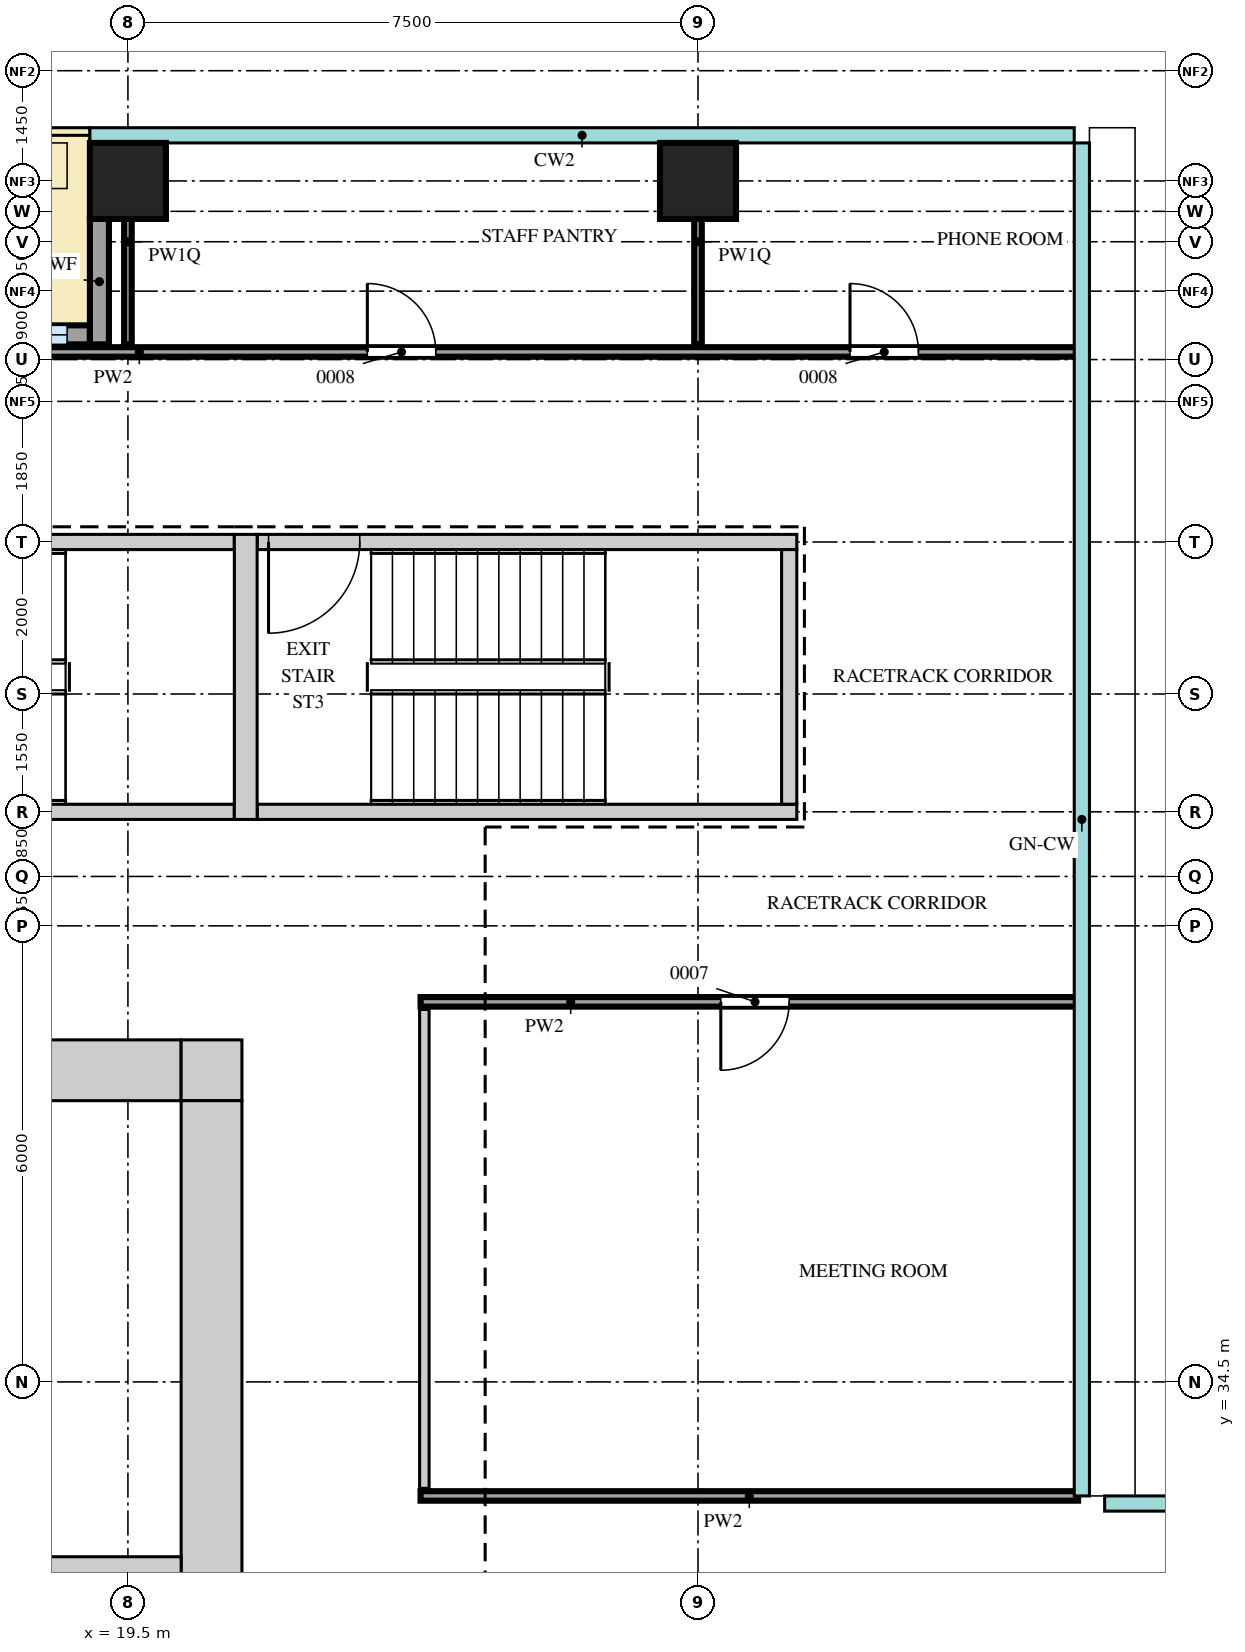
"""IFC4 building model, lengths in metres.
Left out: names, types, materials, properties, quantities, classifications, styles, units other than length and angle.
Written with IfcOpenShell. Run it as: python <this file> out.ifc"""

import sys

from ifc_helpers import new_model, si_unit, direction, frame, frame_2d, origin, origin_2d, place, context, subcontext, project, spatial, rectangle, extrude, source, transform, mapped, element, fill, save


model = new_model("IFC4")
c1 = context("Model", 3, precision=1e-05, world=origin(), true_north=direction((0.0, 1.0)))
c2 = subcontext(c1, "Body", "Model", "MODEL_VIEW")
j1 = project(units=[si_unit("LENGTHUNIT", "METRE"), si_unit("PLANEANGLEUNIT", "RADIAN")], contexts=[c1])
p1 = place(None, origin())
s1 = spatial("IfcSite", under=j1, at=p1, CompositionType="ELEMENT")
p2 = place(p1, origin())
s2 = spatial("IfcBuilding", under=s1, at=p2, CompositionType="ELEMENT")
p3 = place(p2, frame((0.0, 0.0, 172.7)))
s3 = spatial("IfcBuildingStorey", under=s2, at=p3, CompositionType="ELEMENT", Elevation=172.7)
m1 = source(origin(), c2, "Body", "SweptSolid", [
    extrude(rectangle(XDim=13.4, YDim=0.8, at=frame_2d((6.7, 0.0))), origin(), (0.0, 0.0, 1.0), 3.75),
])
p4 = place(p3, frame((6.8, 38.6, 0.0), z_axis=(0.0, 0.0, 1.0), x_axis=(1.0, 0.0, 0.0)))
e1 = element("IfcWall", 1, at=p4, inside=s3, PredefinedType="SHEAR", context=c2, shape_type="MappedRepresentation", body=[
    mapped(m1, transform((0.0, 0.0, 0.0))),
])
m2 = source(origin(), c2, "Body", "SweptSolid", [
    extrude(rectangle(XDim=0.9, YDim=2.1, at=frame_2d((0.45, 1.05))), frame((0.0, 0.41, 0.0), z_axis=(0.0, -1.0, 0.0), x_axis=(1.0, 0.0, 0.0)), (0.0, 0.0, 1.0), 0.82),
])
p5 = place(p4, frame((2.9, 0.0, 0.0)))
e2 = element("IfcOpeningElement", 2, at=p5, cuts=e1, PredefinedType="OPENING", context=c2, shape_type="MappedRepresentation", body=[
    mapped(m2, transform((0.0, 0.0, 0.0))),
])
p6 = place(p4, frame((9.6, 0.0, 0.0)))
e3 = element("IfcOpeningElement", 3, at=p6, cuts=e1, PredefinedType="OPENING", context=c2, shape_type="MappedRepresentation", body=[
    mapped(m2, transform((0.0, 0.0, 0.0))),
])
m3 = source(origin(), c2, "Body", "SweptSolid", [
    extrude(rectangle(XDim=0.8, YDim=0.8, at=frame_2d((0.4, 0.0))), origin(), (0.0, 0.0, 1.0), 3.75),
])
p7 = place(p3, frame((20.2, 38.6, 0.0), z_axis=(0.0, 0.0, 1.0), x_axis=(1.0, 0.0, 0.0)))
e4 = element("IfcWall", 4, at=p7, inside=s3, PredefinedType="SHEAR", context=c2, shape_type="MappedRepresentation", body=[
    mapped(m3, transform((0.0, 0.0, 0.0))),
])
m4 = source(origin(), c2, "Body", "SweptSolid", [
    extrude(rectangle(XDim=22.4, YDim=0.8, at=frame_2d((11.2, 0.0))), origin(), (0.0, 0.0, 1.0), 3.75),
])
p8 = place(p3, frame((20.6, 15.8, 0.0), z_axis=(0.0, 0.0, 1.0), x_axis=(0.0, 1.0, 0.0)))
e5 = element("IfcWall", 5, at=p8, inside=s3, PredefinedType="SHEAR", context=c2, shape_type="MappedRepresentation", body=[
    mapped(m4, transform((0.0, 0.0, 0.0))),
])
m5 = source(origin(), c2, "Body", "SweptSolid", [
    extrude(rectangle(XDim=1.8, YDim=2.1, at=frame_2d((0.9, 1.05))), frame((0.0, 0.41, 0.0), z_axis=(0.0, -1.0, 0.0), x_axis=(1.0, 0.0, 0.0)), (0.0, 0.0, 1.0), 0.82),
])
p9 = place(p8, frame((10.7, 0.0, 0.0)))
e6 = element("IfcOpeningElement", 6, at=p9, cuts=e5, PredefinedType="OPENING", context=c2, shape_type="MappedRepresentation", body=[
    mapped(m5, transform((0.0, 0.0, 0.0))),
])
p10 = place(p8, frame((0.35, 0.0, 0.0)))
e7 = element("IfcOpeningElement", 7, at=p10, cuts=e5, PredefinedType="OPENING", context=c2, shape_type="MappedRepresentation", body=[
    mapped(m2, transform((0.0, 0.0, 0.0))),
])
p11 = place(p8, frame((2.8, 0.0, 0.0)))
e8 = element("IfcOpeningElement", 8, at=p11, cuts=e5, PredefinedType="OPENING", context=c2, shape_type="MappedRepresentation", body=[
    mapped(m2, transform((0.0, 0.0, 0.0))),
])
p12 = place(p8, frame((5.55, 0.0, 0.0)))
e9 = element("IfcOpeningElement", 9, at=p12, cuts=e5, PredefinedType="OPENING", context=c2, shape_type="MappedRepresentation", body=[
    mapped(m2, transform((0.0, 0.0, 0.0))),
])
m6 = source(origin(), c2, "Body", "SweptSolid", [
    extrude(rectangle(XDim=7.0, YDim=0.2, at=frame_2d((3.5, 0.0))), origin(), (0.0, 0.0, 1.0), 3.75),
])
p13 = place(p3, frame((13.9, 45.55, 0.0), z_axis=(0.0, 0.0, 1.0), x_axis=(1.0, 0.0, 0.0)))
e10 = element("IfcWall", 10, at=p13, inside=s3, PredefinedType="SHEAR", context=c2, shape_type="MappedRepresentation", body=[
    mapped(m6, transform((0.0, 0.0, 0.0))),
])
m7 = source(origin(), c2, "Body", "SweptSolid", [
    extrude(rectangle(XDim=1.2, YDim=2.1, at=frame_2d((0.6, 1.05))), frame((0.0, 0.11, 0.0), z_axis=(0.0, -1.0, 0.0), x_axis=(1.0, 0.0, 0.0)), (0.0, 0.0, 1.0), 0.22),
])
p14 = place(p13, frame((0.35, 0.0, 0.0)))
e11 = element("IfcOpeningElement", 11, at=p14, cuts=e10, PredefinedType="OPENING", context=c2, shape_type="MappedRepresentation", body=[
    mapped(m7, transform((0.0, 0.0, 0.0))),
])
p15 = place(p3, frame((13.9, 42.0, 0.0), z_axis=(0.0, 0.0, 1.0), x_axis=(1.0, 0.0, 0.0)))
e12 = element("IfcWall", 12, at=p15, inside=s3, PredefinedType="SHEAR", context=c2, shape_type="MappedRepresentation", body=[
    mapped(m6, transform((0.0, 0.0, 0.0))),
])
m8 = source(origin(), c2, "Body", "SweptSolid", [
    extrude(rectangle(XDim=7.1, YDim=0.2, at=frame_2d((3.55, 0.0))), origin(), (0.0, 0.0, 1.0), 3.75),
])
p16 = place(p3, frame((21.2, 45.55, 0.0), z_axis=(0.0, 0.0, 1.0), x_axis=(1.0, 0.0, 0.0)))
e13 = element("IfcWall", 13, at=p16, inside=s3, PredefinedType="SHEAR", context=c2, shape_type="MappedRepresentation", body=[
    mapped(m8, transform((0.0, 0.0, 0.0))),
])
p17 = place(p16, frame((0.15, 0.0, 0.0)))
e14 = element("IfcOpeningElement", 14, at=p17, cuts=e13, PredefinedType="OPENING", context=c2, shape_type="MappedRepresentation", body=[
    mapped(m7, transform((0.0, 0.0, 0.0))),
])
p18 = place(p3, frame((21.2, 42.0, 0.0), z_axis=(0.0, 0.0, 1.0), x_axis=(1.0, 0.0, 0.0)))
e15 = element("IfcWall", 15, at=p18, inside=s3, PredefinedType="SHEAR", context=c2, shape_type="MappedRepresentation", body=[
    mapped(m8, transform((0.0, 0.0, 0.0))),
])
m9 = source(origin(), c2, "Body", "SweptSolid", [
    extrude(rectangle(XDim=3.75, YDim=0.3, at=frame_2d((1.875, 0.0))), origin(), (0.0, 0.0, 1.0), 3.75),
])
p19 = place(p3, frame((21.05, 41.9, 0.0), z_axis=(0.0, 0.0, 1.0), x_axis=(0.0, 1.0, 0.0)))
e16 = element("IfcWall", 16, at=p19, inside=s3, PredefinedType="SHEAR", context=c2, shape_type="MappedRepresentation", body=[
    mapped(m9, transform((0.0, 0.0, 0.0))),
])
m10 = source(origin(), c2, "Body", "SweptSolid", [
    extrude(rectangle(XDim=3.35, YDim=0.2, at=frame_2d((1.675, 0.0))), origin(), (0.0, 0.0, 1.0), 3.75),
])
p20 = place(p3, frame((28.2, 42.1, 0.0), z_axis=(0.0, 0.0, 1.0), x_axis=(0.0, 1.0, 0.0)))
e17 = element("IfcWall", 17, at=p20, inside=s3, PredefinedType="SHEAR", context=c2, shape_type="MappedRepresentation", body=[
    mapped(m10, transform((0.0, 0.0, 0.0))),
])
m11 = source(origin(), c2, "Body", "SweptSolid", [
    extrude(rectangle(XDim=13.4, YDim=0.3, at=frame_2d((6.7, 0.0))), origin(), (0.0, 0.0, 1.0), 3.75),
])
p21 = place(p3, frame((6.8, 32.05, 0.0), z_axis=(0.0, 0.0, 1.0), x_axis=(1.0, 0.0, 0.0)))
e18 = element("IfcWall", 18, at=p21, inside=s3, PredefinedType="STANDARD", context=c2, shape_type="MappedRepresentation", body=[
    mapped(m11, transform((0.0, 0.0, 0.0))),
])
m12 = source(origin(), c2, "Body", "SweptSolid", [
    extrude(rectangle(XDim=1.0, YDim=1.0, at=origin_2d()), origin(), (0.0, 0.0, 1.0), 3.75),
])
for number, where, z_axis, x_axis in (
    (19, (19.5, 50.3, 0.0), (0.0, 0.0, 1.0), (1.0, 0.0, 0.0)),
    (20, (27.0, 50.3, 0.0), (0.0, 0.0, 1.0), (1.0, 0.0, 0.0)),
):
    element("IfcColumn", number, at=place(p3, frame(where, z_axis=z_axis, x_axis=x_axis)), inside=s3, PredefinedType="COLUMN", context=c2, shape_type="MappedRepresentation", body=[
        mapped(m12, transform((0.0, 0.0, 0.0))),
    ])
m13 = source(origin(), c2, "Body", "SweptSolid", [
    extrude(rectangle(XDim=6.5, YDim=0.25, at=frame_2d((3.25, 0.0))), origin(), (0.0, 0.0, 1.0), 3.75),
])
p22 = place(p3, frame((12.5, 48.275, 0.0), z_axis=(0.0, 0.0, 1.0), x_axis=(1.0, 0.0, 0.0)))
e21 = element("IfcWall", 21, at=p22, inside=s3, PredefinedType="SOLIDWALL", context=c2, shape_type="MappedRepresentation", body=[
    mapped(m13, transform((0.0, 0.0, 0.0))),
])
m14 = source(origin(), c2, "Body", "SweptSolid", [
    extrude(rectangle(XDim=1.75, YDim=2.4, at=frame_2d((0.875, 1.2))), frame((0.0, 0.135, 0.0), z_axis=(0.0, -1.0, 0.0), x_axis=(1.0, 0.0, 0.0)), (0.0, 0.0, 1.0), 0.27),
])
p23 = place(p22, frame((0.3, 0.0, 0.0)))
e22 = element("IfcOpeningElement", 22, at=p23, cuts=e21, PredefinedType="OPENING", context=c2, shape_type="MappedRepresentation", body=[
    mapped(m14, transform((0.0, 0.0, 0.0))),
])
p24 = place(p22, frame((4.45, 0.0, 0.0)))
e23 = element("IfcOpeningElement", 23, at=p24, cuts=e21, PredefinedType="OPENING", context=c2, shape_type="MappedRepresentation", body=[
    mapped(m14, transform((0.0, 0.0, 0.0))),
])
m15 = source(origin(), c2, "Body", "SweptSolid", [
    extrude(rectangle(XDim=1.8, YDim=2.4, at=frame_2d((0.9, 1.2))), frame((0.0, 0.135, 0.0), z_axis=(0.0, -1.0, 0.0), x_axis=(1.0, 0.0, 0.0)), (0.0, 0.0, 1.0), 0.27),
])
p25 = place(p22, frame((2.35, 0.0, 0.0)))
e24 = element("IfcOpeningElement", 24, at=p25, cuts=e21, PredefinedType="OPENING", context=c2, shape_type="MappedRepresentation", body=[
    mapped(m15, transform((0.0, 0.0, 0.0))),
])
m16 = source(origin(), c2, "Body", "SweptSolid", [
    extrude(rectangle(XDim=1.65, YDim=0.25, at=frame_2d((0.825, 0.0))), origin(), (0.0, 0.0, 1.0), 3.45),
])
p26 = place(p3, frame((19.125, 49.8, 0.0), z_axis=(0.0, 0.0, 1.0), x_axis=(0.0, -1.0, 0.0)))
e25 = element("IfcWall", 25, at=p26, inside=s3, PredefinedType="SOLIDWALL", context=c2, shape_type="MappedRepresentation", body=[
    mapped(m16, transform((0.0, 0.0, 0.0))),
])
m17 = source(origin(), c2, "Body", "SweptSolid", [
    extrude(rectangle(XDim=8.65, YDim=0.125, at=frame_2d((4.325, 0.0))), origin(), (0.0, 0.0, 1.0), 3.8),
])
p27 = place(p3, frame((23.35, 33.0, 0.0), z_axis=(0.0, 0.0, 1.0), x_axis=(1.0, 0.0, 0.0)))
e26 = element("IfcWall", 26, at=p27, inside=s3, PredefinedType="PARTITIONING", context=c2, shape_type="MappedRepresentation", body=[
    mapped(m17, transform((0.0, 0.0, 0.0))),
])
m18 = source(origin(), c2, "Body", "SweptSolid", [
    extrude(rectangle(XDim=6.3, YDim=0.125, at=frame_2d((3.15, 0.0))), origin(), (0.0, 0.0, 1.0), 3.8),
])
p28 = place(p3, frame((23.4, 33.1, 0.0), z_axis=(0.0, 0.0, 1.0), x_axis=(0.0, 1.0, 0.0)))
e27 = element("IfcWall", 27, at=p28, inside=s3, PredefinedType="PARTITIONING", context=c2, shape_type="MappedRepresentation", body=[
    mapped(m18, transform((0.0, 0.0, 0.0))),
])
p29 = place(p3, frame((23.35, 39.5, 0.0), z_axis=(0.0, 0.0, 1.0), x_axis=(1.0, 0.0, 0.0)))
e28 = element("IfcWall", 28, at=p29, inside=s3, PredefinedType="PARTITIONING", context=c2, shape_type="MappedRepresentation", body=[
    mapped(m17, transform((0.0, 0.0, 0.0))),
])
m19 = source(origin(), c2, "Body", "SweptSolid", [
    extrude(rectangle(XDim=0.9, YDim=2.1, at=frame_2d((0.45, 1.05))), frame((0.0, 0.073, 0.0), z_axis=(0.0, -1.0, 0.0), x_axis=(1.0, 0.0, 0.0)), (0.0, 0.0, 1.0), 0.145),
])
p30 = place(p29, frame((3.95, 0.0, 0.0)))
e29 = element("IfcOpeningElement", 29, at=p30, cuts=e28, PredefinedType="OPENING", context=c2, shape_type="MappedRepresentation", body=[
    mapped(m19, transform((0.0, 0.0, 0.0))),
])
m20 = source(origin(), c2, "Body", "SweptSolid", [
    extrude(rectangle(XDim=24.35, YDim=0.125, at=frame_2d((12.175, 0.0))), origin(), (0.0, 0.0, 1.0), 3.8),
])
p31 = place(p3, frame((7.65, 48.05, 0.0), z_axis=(0.0, 0.0, 1.0), x_axis=(1.0, 0.0, 0.0)))
e30 = element("IfcWall", 30, at=p31, inside=s3, PredefinedType="PARTITIONING", context=c2, shape_type="MappedRepresentation", body=[
    mapped(m20, transform((0.0, 0.0, 0.0))),
])
p32 = place(p31, frame((1.5, 0.0, 0.0)))
e31 = element("IfcOpeningElement", 31, at=p32, cuts=e30, PredefinedType="OPENING", context=c2, shape_type="MappedRepresentation", body=[
    mapped(m19, transform((0.0, 0.0, 0.0))),
])
m21 = source(origin(), c2, "Body", "SweptSolid", [
    extrude(rectangle(XDim=1.8, YDim=2.1, at=frame_2d((0.9, 1.05))), frame((0.0, 0.073, 0.0), z_axis=(0.0, -1.0, 0.0), x_axis=(1.0, 0.0, 0.0)), (0.0, 0.0, 1.0), 0.145),
])
p33 = place(p31, frame((7.2, 0.0, 0.0)))
e32 = element("IfcOpeningElement", 32, at=p33, cuts=e30, PredefinedType="OPENING", context=c2, shape_type="MappedRepresentation", body=[
    mapped(m21, transform((0.0, 0.0, 0.0))),
])
p34 = place(p31, frame((15.0, 0.0, 0.0)))
e33 = element("IfcOpeningElement", 33, at=p34, cuts=e30, PredefinedType="OPENING", context=c2, shape_type="MappedRepresentation", body=[
    mapped(m19, transform((0.0, 0.0, 0.0))),
])
p35 = place(p31, frame((21.35, 0.0, 0.0)))
e34 = element("IfcOpeningElement", 34, at=p35, cuts=e30, PredefinedType="OPENING", context=c2, shape_type="MappedRepresentation", body=[
    mapped(m19, transform((0.0, 0.0, 0.0))),
])
m22 = source(origin(), c2, "Body", "SweptSolid", [
    extrude(rectangle(XDim=2.7, YDim=0.1, at=frame_2d((1.35, 0.0))), origin(), (0.0, 0.0, 1.0), 3.42),
])
for number, where, z_axis, x_axis in (
    (35, (19.5, 48.15, 0.0), (0.0, 0.0, 1.0), (0.0, 1.0, 0.0)),
    (36, (27.0, 48.15, 0.0), (0.0, 0.0, 1.0), (0.0, 1.0, 0.0)),
):
    element("IfcWall", number, at=place(p3, frame(where, z_axis=z_axis, x_axis=x_axis)), inside=s3, PredefinedType="PARTITIONING", context=c2, shape_type="MappedRepresentation", body=[
        mapped(m22, transform((0.0, 0.0, 0.0))),
    ])
m23 = source(origin(), c2, "Body", "SweptSolid", [
    extrude(rectangle(XDim=1.75, YDim=2.4, at=frame_2d((0.875, 1.2))), frame((0.0, 0.03, 0.0), z_axis=(0.0, -1.0, 0.0), x_axis=(1.0, 0.0, 0.0)), (0.0, 0.0, 1.0), 0.06),
])
p36 = place(p24, origin())
e37 = element("IfcWindow", 37, at=p36, inside=s3, PartitioningType="SINGLE_PANEL", PredefinedType="WINDOW", context=c2, shape_type="MappedRepresentation", body=[
    mapped(m23, transform((0.0, 0.0, 0.0))),
])
fill(e23, e37)
m24 = source(origin(), c2, "Body", "SweptSolid", [
    extrude(rectangle(XDim=0.9, YDim=2.1, at=frame_2d((0.45, 1.05))), frame((0.0, 0.025, 0.0), z_axis=(0.0, -1.0, 0.0), x_axis=(1.0, 0.0, 0.0)), (0.0, 0.0, 1.0), 0.05),
])
p37 = place(p30, origin())
e38 = element("IfcDoor", 38, at=p37, inside=s3, OperationType="SINGLE_SWING_LEFT", PredefinedType="DOOR", context=c2, shape_type="MappedRepresentation", body=[
    mapped(m24, transform((0.0, 0.0, 0.0))),
])
fill(e29, e38)
p38 = place(p34, origin())
e39 = element("IfcDoor", 39, at=p38, inside=s3, OperationType="SINGLE_SWING_RIGHT", PredefinedType="DOOR", context=c2, shape_type="MappedRepresentation", body=[
    mapped(m24, transform((0.0, 0.0, 0.0))),
])
fill(e33, e39)
p39 = place(p35, origin())
e40 = element("IfcDoor", 40, at=p39, inside=s3, OperationType="SINGLE_SWING_RIGHT", PredefinedType="DOOR", context=c2, shape_type="MappedRepresentation", body=[
    mapped(m24, transform((0.0, 0.0, 0.0))),
])
fill(e34, e40)
m25 = source(origin(), c2, "Body", "SweptSolid", [
    extrude(rectangle(XDim=1.2, YDim=2.1, at=frame_2d((0.6, 1.05))), frame((0.0, 0.025, 0.0), z_axis=(0.0, -1.0, 0.0), x_axis=(1.0, 0.0, 0.0)), (0.0, 0.0, 1.0), 0.05),
])
p40 = place(p17, origin())
e41 = element("IfcDoor", 41, at=p40, inside=s3, OperationType="SINGLE_SWING_LEFT", PredefinedType="DOOR", context=c2, shape_type="MappedRepresentation", body=[
    mapped(m25, transform((0.0, 0.0, 0.0))),
])
fill(e14, e41)
save(model, sys.argv[1])
